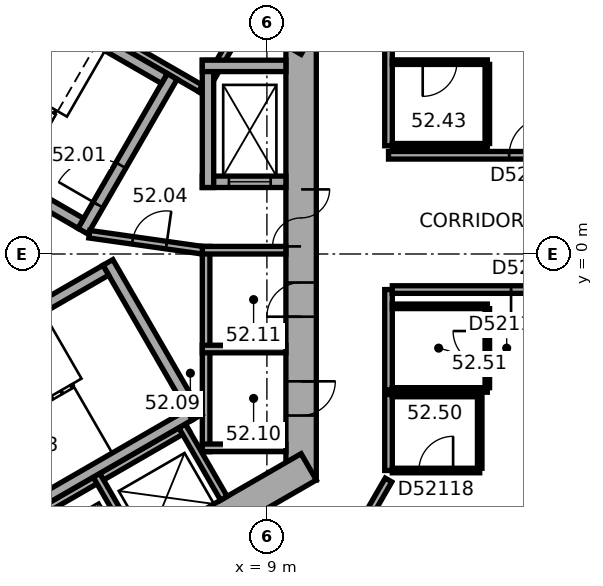
"""IFC4 building model, lengths in metres.
Left out: names, types, materials, properties, quantities, classifications, styles, units other than length and angle.
Written with IfcOpenShell. Run it as: python <this file> out.ifc"""

import sys

from ifc_helpers import new_model, si_unit, direction, frame, frame_2d, origin, place, context, subcontext, project, spatial, rectangle, extrude, element, fill, save


model = new_model("IFC4")
c1 = context("Model", 3, precision=1e-05, world=origin(), true_north=direction((0.0, 1.0)))
c2 = subcontext(c1, "Body", "Model", "MODEL_VIEW")
j1 = project(units=[si_unit("LENGTHUNIT", "METRE"), si_unit("PLANEANGLEUNIT", "RADIAN")], contexts=[c1])
p1 = place(None, origin())
s1 = spatial("IfcSite", under=j1, at=p1, CompositionType="ELEMENT")
p2 = place(p1, origin())
s2 = spatial("IfcBuilding", under=s1, at=p2, CompositionType="ELEMENT")
p3 = place(p2, frame((0.0, 0.0, 210.6)))
s3 = spatial("IfcBuildingStorey", under=s2, at=p3, CompositionType="ELEMENT", Elevation=210.6)
p4 = place(p3, frame((9.9, -5.947, 0.0), z_axis=(0.0, 0.0, 1.0), x_axis=(0.0, 1.0, 0.0)))
e1 = element("IfcWall", 1, at=p4, inside=s3, PredefinedType="SHEAR", context=c2, shape_type="SweptSolid", body=[
    extrude(rectangle(XDim=11.894, YDim=0.8, at=frame_2d((5.947, 0.0))), origin(), (0.0, 0.0, 1.0), 3.7),
])
p5 = place(p4, frame((6.147, 0.0, 0.0)))
e2 = element("IfcOpeningElement", 2, at=p5, cuts=e1, PredefinedType="OPENING", context=c2, shape_type="SweptSolid", body=[
    extrude(rectangle(XDim=1.5, YDim=2.1, at=frame_2d((0.75, 1.05))), frame((0.0, 0.41, 0.0), z_axis=(0.0, -1.0, 0.0), x_axis=(1.0, 0.0, 0.0)), (0.0, 0.0, 1.0), 0.82),
])
p6 = place(p4, frame((1.697, 0.0, 0.0)))
e3 = element("IfcOpeningElement", 3, at=p6, cuts=e1, PredefinedType="OPENING", context=c2, shape_type="SweptSolid", body=[
    extrude(rectangle(XDim=0.9, YDim=2.1, at=frame_2d((0.45, 1.05))), frame((0.0, 0.41, 0.0), z_axis=(0.0, -1.0, 0.0), x_axis=(1.0, 0.0, 0.0)), (0.0, 0.0, 1.0), 0.82),
])
p7 = place(p4, frame((4.297, 0.0, 0.0)))
e4 = element("IfcOpeningElement", 4, at=p7, cuts=e1, PredefinedType="OPENING", context=c2, shape_type="SweptSolid", body=[
    extrude(rectangle(XDim=0.9, YDim=2.1, at=frame_2d((0.45, 1.05))), frame((0.0, 0.41, 0.0), z_axis=(0.0, -1.0, 0.0), x_axis=(1.0, 0.0, 0.0)), (0.0, 0.0, 1.0), 0.82),
])
p8 = place(p3, frame((10.1, 5.6, 0.0), z_axis=(0.0, 0.0, 1.0), x_axis=(-0.866023897231, 0.500002609418, 0.0)))
e5 = element("IfcWall", 5, at=p8, inside=s3, PredefinedType="SHEAR", context=c2, shape_type="SweptSolid", body=[
    extrude(rectangle(XDim=11.894, YDim=0.8, at=frame_2d((5.947, 0.0))), origin(), (0.0, 0.0, 1.0), 3.7),
])
p9 = place(p8, frame((5.197, 0.0, 0.0)))
e6 = element("IfcOpeningElement", 6, at=p9, cuts=e5, PredefinedType="OPENING", context=c2, shape_type="SweptSolid", body=[
    extrude(rectangle(XDim=0.9, YDim=2.1, at=frame_2d((0.45, 1.05))), frame((0.0, 0.41, 0.0), z_axis=(0.0, -1.0, 0.0), x_axis=(1.0, 0.0, 0.0)), (0.0, 0.0, 1.0), 0.82),
])
p10 = place(p3, frame((-0.2, -11.547, 0.0), z_axis=(0.0, 0.0, 1.0), x_axis=(0.866023897231, 0.500002609418, 0.0)))
e7 = element("IfcWall", 7, at=p10, inside=s3, PredefinedType="SHEAR", context=c2, shape_type="SweptSolid", body=[
    extrude(rectangle(XDim=11.894, YDim=0.8, at=frame_2d((5.947, 0.0))), origin(), (0.0, 0.0, 1.0), 3.7),
])
p11 = place(p10, frame((2.497, 0.0, 0.0)))
e8 = element("IfcOpeningElement", 8, at=p11, cuts=e7, PredefinedType="OPENING", context=c2, shape_type="SweptSolid", body=[
    extrude(rectangle(XDim=1.1, YDim=2.1, at=frame_2d((0.55, 1.05))), frame((0.0, 0.41, 0.0), z_axis=(0.0, -1.0, 0.0), x_axis=(1.0, 0.0, 0.0)), (0.0, 0.0, 1.0), 0.82),
])
p12 = place(p10, frame((5.097, 0.0, 0.0)))
e9 = element("IfcOpeningElement", 9, at=p12, cuts=e7, PredefinedType="OPENING", context=c2, shape_type="SweptSolid", body=[
    extrude(rectangle(XDim=1.1, YDim=2.1, at=frame_2d((0.55, 1.05))), frame((0.0, 0.41, 0.0), z_axis=(0.0, -1.0, 0.0), x_axis=(1.0, 0.0, 0.0)), (0.0, 0.0, 1.0), 0.82),
])
p13 = place(p10, frame((7.697, 0.0, 0.0)))
e10 = element("IfcOpeningElement", 10, at=p13, cuts=e7, PredefinedType="OPENING", context=c2, shape_type="SweptSolid", body=[
    extrude(rectangle(XDim=1.1, YDim=2.1, at=frame_2d((0.55, 1.05))), frame((0.0, 0.41, 0.0), z_axis=(0.0, -1.0, 0.0), x_axis=(1.0, 0.0, 0.0)), (0.0, 0.0, 1.0), 0.82),
])
p14 = place(p3, frame((7.4, -5.2, 0.0), z_axis=(0.0, 0.0, 1.0), x_axis=(0.0, 1.0, 0.0)))
e11 = element("IfcWall", 11, at=p14, inside=s3, PredefinedType="PARTITIONING", context=c2, shape_type="SweptSolid", body=[
    extrude(rectangle(XDim=5.4, YDim=0.2, at=frame_2d((2.7, 0.0))), origin(), (0.0, 0.0, 1.0), 3.35),
])
for number, where, z_axis, x_axis in (
    (12, (7.3, -5.1, 0.0), (0.0, 0.0, 1.0), (1.0, 0.0, 0.0)),
    (13, (7.3, -2.5, 0.0), (0.0, 0.0, 1.0), (1.0, 0.0, 0.0)),
    (14, (7.3, 0.1, 0.0), (0.0, 0.0, 1.0), (1.0, 0.0, 0.0)),
):
    element("IfcWall", number, at=place(p3, frame(where, z_axis=z_axis, x_axis=x_axis)), inside=s3, PredefinedType="PARTITIONING", context=c2, shape_type="SweptSolid", body=[
        extrude(rectangle(XDim=2.2, YDim=0.2, at=frame_2d((1.1, 0.0))), origin(), (0.0, 0.0, 1.0), 3.35),
    ])
p15 = place(p3, frame((7.424, 4.259, 0.0), z_axis=(0.0, 0.0, 1.0), x_axis=(-0.866026010844, 0.49999894854, 0.0)))
e15 = element("IfcWall", 15, at=p15, inside=s3, PredefinedType="PARTITIONING", context=c2, shape_type="SweptSolid", body=[
    extrude(rectangle(XDim=8.0, YDim=0.2, at=frame_2d((4.0, 0.0))), origin(), (0.0, 0.0, 1.0), 3.35),
])
p16 = place(p3, frame((7.287, 4.222, 0.0), z_axis=(0.0, 0.0, 1.0), x_axis=(0.499946605688, 0.86605622881, 0.0)))
e16 = element("IfcWall", 16, at=p16, inside=s3, PredefinedType="PARTITIONING", context=c2, shape_type="SweptSolid", body=[
    extrude(rectangle(XDim=2.2, YDim=0.2, at=frame_2d((1.1, 0.0))), origin(), (0.0, 0.0, 1.0), 3.35),
])
p17 = place(p3, frame((-0.024, -8.559, 0.0), z_axis=(0.0, 0.0, 1.0), x_axis=(0.866026010844, 0.49999894854, 0.0)))
e17 = element("IfcWall", 17, at=p17, inside=s3, PredefinedType="PARTITIONING", context=c2, shape_type="SweptSolid", body=[
    extrude(rectangle(XDim=8.0, YDim=0.2, at=frame_2d((4.0, 0.0))), origin(), (0.0, 0.0, 1.0), 3.35),
])
for number, where, z_axis, x_axis in (
    (18, (4.516, -5.822, 0.0), (0.0, 0.0, 1.0), (0.5, -0.866, 0.0)),
    (19, (6.768, -4.522, 0.0), (0.0, 0.0, 1.0), (0.5, -0.866, 0.0)),
):
    element("IfcWall", number, at=place(p3, frame(where, z_axis=z_axis, x_axis=x_axis)), inside=s3, PredefinedType="PARTITIONING", context=c2, shape_type="SweptSolid", body=[
        extrude(rectangle(XDim=2.2, YDim=0.2, at=frame_2d((1.1, 0.0))), origin(), (0.0, 0.0, 1.0), 3.35),
    ])
p18 = place(p3, frame((4.158, 0.602, 0.0), z_axis=(0.0, 0.0, 1.0), x_axis=(0.499977259774, 0.866038532462, 0.0)))
e20 = element("IfcWall", 20, at=p18, inside=s3, PredefinedType="SHEAR", context=c2, shape_type="SweptSolid", body=[
    extrude(rectangle(XDim=4.7, YDim=0.3, at=frame_2d((2.35, 0.0))), origin(), (0.0, 0.0, 1.0), 3.35),
])
p19 = place(p18, frame((0.8, 0.0, 0.0)))
e21 = element("IfcOpeningElement", 21, at=p19, cuts=e20, PredefinedType="OPENING", context=c2, shape_type="SweptSolid", body=[
    extrude(rectangle(XDim=1.2, YDim=2.1, at=frame_2d((0.6, 1.05))), frame((0.0, 0.16, 0.0), z_axis=(0.0, -1.0, 0.0), x_axis=(1.0, 0.0, 0.0)), (0.0, 0.0, 1.0), 0.32),
])
for number, where, z_axis, x_axis in (
    (22, (4.103, 0.807, 0.0), (0.0, 0.0, 1.0), (-0.866, 0.5, 0.0)),
    (23, (6.303, 4.617, 0.0), (0.0, 0.0, 1.0), (-0.866, 0.5, 0.0)),
):
    element("IfcWall", number, at=place(p3, frame(where, z_axis=z_axis, x_axis=x_axis)), inside=s3, PredefinedType="SHEAR", context=c2, shape_type="SweptSolid", body=[
        extrude(rectangle(XDim=7.06, YDim=0.3, at=frame_2d((3.53, 0.0))), origin(), (0.0, 0.0, 1.0), 3.35),
    ])
p20 = place(p3, frame((4.816, -0.222, 0.0), z_axis=(0.0, 0.0, 1.0), x_axis=(0.499977259774, -0.866038532462, 0.0)))
e24 = element("IfcWall", 24, at=p20, inside=s3, PredefinedType="SHEAR", context=c2, shape_type="SweptSolid", body=[
    extrude(rectangle(XDim=4.7, YDim=0.3, at=frame_2d((2.35, 0.0))), origin(), (0.0, 0.0, 1.0), 3.35),
])
for number, where, z_axis, x_axis in (
    (25, (-1.353, -3.957, 0.0), (0.0, 0.0, 1.0), (0.866, 0.5, 0.0)),
    (26, (0.847, -7.767, 0.0), (0.0, 0.0, 1.0), (0.866, 0.5, 0.0)),
):
    element("IfcWall", number, at=place(p3, frame(where, z_axis=z_axis, x_axis=x_axis)), inside=s3, PredefinedType="SHEAR", context=c2, shape_type="SweptSolid", body=[
        extrude(rectangle(XDim=7.06, YDim=0.3, at=frame_2d((3.53, 0.0))), origin(), (0.0, 0.0, 1.0), 3.35),
    ])
p21 = place(p3, frame((7.3, 1.9, 0.0), z_axis=(0.0, 0.0, 1.0), x_axis=(1.0, 0.0, 0.0)))
e27 = element("IfcWall", 27, at=p21, inside=s3, PredefinedType="SHEAR", context=c2, shape_type="SweptSolid", body=[
    extrude(rectangle(XDim=2.2, YDim=0.3, at=frame_2d((1.1, 0.0))), origin(), (0.0, 0.0, 1.0), 3.35),
])
p22 = place(p21, frame((0.7, 0.0, 0.0)))
e28 = element("IfcOpeningElement", 28, at=p22, cuts=e27, PredefinedType="OPENING", context=c2, shape_type="SweptSolid", body=[
    extrude(rectangle(XDim=1.1, YDim=2.1, at=frame_2d((0.55, 1.05))), frame((0.0, 0.16, 0.0), z_axis=(0.0, -1.0, 0.0), x_axis=(1.0, 0.0, 0.0)), (0.0, 0.0, 1.0), 0.32),
])
p23 = place(p3, frame((7.45, 1.75, 0.0), z_axis=(0.0, 0.0, 1.0), x_axis=(0.0, 1.0, 0.0)))
e29 = element("IfcWall", 29, at=p23, inside=s3, PredefinedType="SHEAR", context=c2, shape_type="SweptSolid", body=[
    extrude(rectangle(XDim=3.35, YDim=0.3, at=frame_2d((1.675, 0.0))), origin(), (0.0, 0.0, 1.0), 3.35),
])
p24 = place(p3, frame((7.3, 4.95, 0.0), z_axis=(0.0, 0.0, 1.0), x_axis=(1.0, 0.0, 0.0)))
e30 = element("IfcWall", 30, at=p24, inside=s3, PredefinedType="SHEAR", context=c2, shape_type="SweptSolid", body=[
    extrude(rectangle(XDim=2.2, YDim=0.3, at=frame_2d((1.1, 0.0))), origin(), (0.0, 0.0, 1.0), 3.35),
])
p25 = place(p3, frame((4.327, 0.521, 0.0), z_axis=(0.0, 0.0, 1.0), x_axis=(0.990124376366, -0.14019172346, 0.0)))
e31 = element("IfcWall", 31, at=p25, inside=s3, PredefinedType="PARTITIONING", context=c2, shape_type="SweptSolid", body=[
    extrude(rectangle(XDim=3.002, YDim=0.2, at=frame_2d((1.501, 0.0))), origin(), (0.0, 0.0, 1.0), 3.35),
])
p26 = place(p25, frame((1.15, 0.0, 0.0)))
e32 = element("IfcOpeningElement", 32, at=p26, cuts=e31, PredefinedType="OPENING", context=c2, shape_type="SweptSolid", body=[
    extrude(rectangle(XDim=0.9, YDim=2.1, at=frame_2d((0.45, 1.05))), frame((0.0, 0.11, 0.0), z_axis=(0.0, -1.0, 0.0), x_axis=(1.0, 0.0, 0.0)), (0.0, 0.0, 1.0), 0.22),
])
p27 = place(p3, frame((11.27, -7.558, 0.0), z_axis=(0.0, 0.0, 1.0), x_axis=(0.499964847546, 0.866045698112, 0.0)))
e33 = element("IfcWall", 33, at=p27, inside=s3, PredefinedType="PARTITIONING", context=c2, shape_type="SweptSolid", body=[
    extrude(rectangle(XDim=1.86, YDim=0.2, at=frame_2d((0.93, 0.0))), origin(), (0.0, 0.0, 1.0), 3.35),
])
p28 = place(p3, frame((12.2, -5.697, 0.0), z_axis=(0.0, 0.0, 1.0), x_axis=(0.0, 1.0, 0.0)))
e34 = element("IfcWall", 34, at=p28, inside=s3, PredefinedType="PARTITIONING", context=c2, shape_type="SweptSolid", body=[
    extrude(rectangle(XDim=2.0, YDim=0.2, at=frame_2d((1.0, 0.0))), origin(), (0.0, 0.0, 1.0), 3.35),
])
p29 = place(p3, frame((12.2, -3.577, 0.0), z_axis=(0.0, 0.0, 1.0), x_axis=(0.0, 1.0, 0.0)))
e35 = element("IfcWall", 35, at=p29, inside=s3, PredefinedType="PARTITIONING", context=c2, shape_type="SweptSolid", body=[
    extrude(rectangle(XDim=2.641, YDim=0.2, at=frame_2d((1.321, 0.0))), origin(), (0.0, 0.0, 1.0), 3.35),
])
p30 = place(p3, frame((12.2, 2.848, 0.0), z_axis=(0.0, 0.0, 1.0), x_axis=(0.0, 1.0, 0.0)))
e36 = element("IfcWall", 36, at=p30, inside=s3, PredefinedType="PARTITIONING", context=c2, shape_type="SweptSolid", body=[
    extrude(rectangle(XDim=3.099, YDim=0.2, at=frame_2d((1.549, 0.0))), origin(), (0.0, 0.0, 1.0), 3.35),
])
p31 = place(p3, frame((12.3, -3.697, 0.0), z_axis=(0.0, 0.0, 1.0), x_axis=(1.0, 0.0, 0.0)))
e37 = element("IfcWall", 37, at=p31, inside=s3, PredefinedType="PARTITIONING", context=c2, shape_type="SweptSolid", body=[
    extrude(rectangle(XDim=2.3, YDim=0.12, at=frame_2d((1.15, 0.0))), origin(), (0.0, 0.0, 1.0), 3.35),
])
p32 = place(p3, frame((12.3, -1.377, 0.0), z_axis=(0.0, 0.0, 1.0), x_axis=(1.0, 0.0, 0.0)))
e38 = element("IfcWall", 38, at=p32, inside=s3, PredefinedType="PARTITIONING", context=c2, shape_type="SweptSolid", body=[
    extrude(rectangle(XDim=2.5, YDim=0.12, at=frame_2d((1.25, 0.0))), origin(), (0.0, 0.0, 1.0), 3.35),
])
p33 = place(p3, frame((12.3, -0.936, 0.0), z_axis=(0.0, 0.0, 1.0), x_axis=(1.0, 0.0, 0.0)))
e39 = element("IfcWall", 39, at=p33, inside=s3, PredefinedType="PARTITIONING", context=c2, shape_type="SweptSolid", body=[
    extrude(rectangle(XDim=7.25, YDim=0.2, at=frame_2d((3.625, 0.0))), origin(), (0.0, 0.0, 1.0), 2.65),
])
p34 = place(p33, frame((3.125, 0.0, 0.0)))
e40 = element("IfcOpeningElement", 40, at=p34, cuts=e39, PredefinedType="OPENING", context=c2, shape_type="SweptSolid", body=[
    extrude(rectangle(XDim=1.0, YDim=2.1, at=frame_2d((0.5, 1.05))), frame((0.0, 0.11, 0.0), z_axis=(0.0, -1.0, 0.0), x_axis=(1.0, 0.0, 0.0)), (0.0, 0.0, 1.0), 0.22),
])
p35 = place(p3, frame((12.3, 5.048, 0.0), z_axis=(0.0, 0.0, 1.0), x_axis=(1.0, 0.0, 0.0)))
e41 = element("IfcWall", 41, at=p35, inside=s3, PredefinedType="PARTITIONING", context=c2, shape_type="SweptSolid", body=[
    extrude(rectangle(XDim=2.5, YDim=0.12, at=frame_2d((1.25, 0.0))), origin(), (0.0, 0.0, 1.0), 3.35),
])
p36 = place(p35, frame((0.8, 0.0, 0.0)))
e42 = element("IfcOpeningElement", 42, at=p36, cuts=e41, PredefinedType="OPENING", context=c2, shape_type="SweptSolid", body=[
    extrude(rectangle(XDim=0.9, YDim=2.1, at=frame_2d((0.45, 1.05))), frame((0.0, 0.07, 0.0), z_axis=(0.0, -1.0, 0.0), x_axis=(1.0, 0.0, 0.0)), (0.0, 0.0, 1.0), 0.14),
])
p37 = place(p3, frame((14.6, -5.697, 0.0), z_axis=(0.0, 0.0, 1.0), x_axis=(-1.0, 0.0, 0.0)))
e43 = element("IfcWall", 43, at=p37, inside=s3, PredefinedType="PARTITIONING", context=c2, shape_type="SweptSolid", body=[
    extrude(rectangle(XDim=2.3, YDim=0.12, at=frame_2d((1.15, 0.0))), origin(), (0.0, 0.0, 1.0), 3.35),
])
p38 = place(p37, frame((0.7, 0.0, 0.0)))
e44 = element("IfcOpeningElement", 44, at=p38, cuts=e43, PredefinedType="OPENING", context=c2, shape_type="SweptSolid", body=[
    extrude(rectangle(XDim=0.9, YDim=2.1, at=frame_2d((0.45, 1.05))), frame((0.0, 0.07, 0.0), z_axis=(0.0, -1.0, 0.0), x_axis=(1.0, 0.0, 0.0)), (0.0, 0.0, 1.0), 0.14),
])
p39 = place(p3, frame((14.6, -3.757, 0.0), z_axis=(0.0, 0.0, 1.0), x_axis=(0.0, -1.0, 0.0)))
e45 = element("IfcWall", 45, at=p39, inside=s3, PredefinedType="PARTITIONING", context=c2, shape_type="SweptSolid", body=[
    extrude(rectangle(XDim=1.88, YDim=0.12, at=frame_2d((0.94, 0.0))), origin(), (0.0, 0.0, 1.0), 3.35),
])
p40 = place(p3, frame((14.8, -3.577, 0.0), z_axis=(0.0, 0.0, 1.0), x_axis=(-1.0, 0.0, 0.0)))
e46 = element("IfcWall", 46, at=p40, inside=s3, PredefinedType="PARTITIONING", context=c2, shape_type="SweptSolid", body=[
    extrude(rectangle(XDim=2.5, YDim=0.12, at=frame_2d((1.25, 0.0))), origin(), (0.0, 0.0, 1.0), 3.35),
])
p41 = place(p3, frame((14.8, -1.437, 0.0), z_axis=(0.0, 0.0, 1.0), x_axis=(0.0, -1.0, 0.0)))
e47 = element("IfcWall", 47, at=p41, inside=s3, PredefinedType="PARTITIONING", context=c2, shape_type="SweptSolid", body=[
    extrude(rectangle(XDim=2.08, YDim=0.12, at=frame_2d((1.04, 0.0))), origin(), (0.0, 0.0, 1.0), 3.35),
])
p42 = place(p41, frame((0.59, 0.0, 0.0)))
e48 = element("IfcOpeningElement", 48, at=p42, cuts=e47, PredefinedType="OPENING", context=c2, shape_type="SweptSolid", body=[
    extrude(rectangle(XDim=0.9, YDim=2.1, at=frame_2d((0.45, 1.05))), frame((0.0, 0.07, 0.0), z_axis=(0.0, -1.0, 0.0), x_axis=(1.0, 0.0, 0.0)), (0.0, 0.0, 1.0), 0.14),
])
p43 = place(p3, frame((14.8, 2.848, 0.0), z_axis=(0.0, 0.0, 1.0), x_axis=(-1.0, 0.0, 0.0)))
e49 = element("IfcWall", 49, at=p43, inside=s3, PredefinedType="PARTITIONING", context=c2, shape_type="SweptSolid", body=[
    extrude(rectangle(XDim=2.5, YDim=0.12, at=frame_2d((1.25, 0.0))), origin(), (0.0, 0.0, 1.0), 3.35),
])
p44 = place(p3, frame((14.8, 4.988, 0.0), z_axis=(0.0, 0.0, 1.0), x_axis=(0.0, -1.0, 0.0)))
e50 = element("IfcWall", 50, at=p44, inside=s3, PredefinedType="PARTITIONING", context=c2, shape_type="SweptSolid", body=[
    extrude(rectangle(XDim=2.08, YDim=0.12, at=frame_2d((1.04, 0.0))), origin(), (0.0, 0.0, 1.0), 3.35),
])
p45 = place(p3, frame((19.55, 2.598, 0.0), z_axis=(0.0, 0.0, 1.0), x_axis=(-1.0, 0.0, 0.0)))
e51 = element("IfcWall", 51, at=p45, inside=s3, PredefinedType="PARTITIONING", context=c2, shape_type="SweptSolid", body=[
    extrude(rectangle(XDim=7.35, YDim=0.2, at=frame_2d((3.675, 0.0))), origin(), (0.0, 0.0, 1.0), 3.35),
])
p46 = place(p45, frame((3.175, 0.0, 0.0)))
e52 = element("IfcOpeningElement", 52, at=p46, cuts=e51, PredefinedType="OPENING", context=c2, shape_type="SweptSolid", body=[
    extrude(rectangle(XDim=1.0, YDim=2.1, at=frame_2d((0.5, 1.05))), frame((0.0, 0.11, 0.0), z_axis=(0.0, -1.0, 0.0), x_axis=(1.0, 0.0, 0.0)), (0.0, 0.0, 1.0), 0.22),
])
p47 = place(p5, origin())
e53 = element("IfcDoor", 53, at=p47, inside=s3, OperationType="DOUBLE_DOOR_SINGLE_SWING", PredefinedType="DOOR", context=c2, shape_type="SweptSolid", body=[
    extrude(rectangle(XDim=1.5, YDim=2.1, at=frame_2d((0.75, 1.05))), frame((0.0, 0.025, 0.0), z_axis=(0.0, -1.0, 0.0), x_axis=(1.0, 0.0, 0.0)), (0.0, 0.0, 1.0), 0.05),
])
fill(e2, e53)
p48 = place(p19, origin())
e54 = element("IfcDoor", 54, at=p48, inside=s3, OperationType="SINGLE_SWING_RIGHT", PredefinedType="DOOR", context=c2, shape_type="SweptSolid", body=[
    extrude(rectangle(XDim=1.2, YDim=2.1, at=frame_2d((0.6, 1.05))), frame((0.0, 0.025, 0.0), z_axis=(0.0, -1.0, 0.0), x_axis=(1.0, 0.0, 0.0)), (0.0, 0.0, 1.0), 0.05),
])
fill(e21, e54)
p49 = place(p26, origin())
e55 = element("IfcDoor", 55, at=p49, inside=s3, OperationType="SINGLE_SWING_LEFT", PredefinedType="DOOR", context=c2, shape_type="SweptSolid", body=[
    extrude(rectangle(XDim=0.9, YDim=2.1, at=frame_2d((0.45, 1.05))), frame((0.0, 0.025, 0.0), z_axis=(0.0, -1.0, 0.0), x_axis=(1.0, 0.0, 0.0)), (0.0, 0.0, 1.0), 0.05),
])
fill(e32, e55)
p50 = place(p6, origin())
e56 = element("IfcDoor", 56, at=p50, inside=s3, OperationType="SINGLE_SWING_LEFT", PredefinedType="DOOR", context=c2, shape_type="SweptSolid", body=[
    extrude(rectangle(XDim=0.9, YDim=2.1, at=frame_2d((0.45, 1.05))), frame((0.0, 0.025, 0.0), z_axis=(0.0, -1.0, 0.0), x_axis=(1.0, 0.0, 0.0)), (0.0, 0.0, 1.0), 0.05),
])
fill(e3, e56)
p51 = place(p7, origin())
e57 = element("IfcDoor", 57, at=p51, inside=s3, OperationType="SINGLE_SWING_LEFT", PredefinedType="DOOR", context=c2, shape_type="SweptSolid", body=[
    extrude(rectangle(XDim=0.9, YDim=2.1, at=frame_2d((0.45, 1.05))), frame((0.0, 0.025, 0.0), z_axis=(0.0, -1.0, 0.0), x_axis=(1.0, 0.0, 0.0)), (0.0, 0.0, 1.0), 0.05),
])
fill(e4, e57)
p52 = place(p22, origin())
e58 = element("IfcDoor", 58, at=p52, inside=s3, OperationType="DOUBLE_DOOR_SLIDING", PredefinedType="DOOR", context=c2, shape_type="SweptSolid", body=[
    extrude(rectangle(XDim=1.1, YDim=2.1, at=frame_2d((0.55, 1.05))), frame((0.0, 0.025, 0.0), z_axis=(0.0, -1.0, 0.0), x_axis=(1.0, 0.0, 0.0)), (0.0, 0.0, 1.0), 0.05),
])
fill(e28, e58)
p53 = place(p46, origin())
e59 = element("IfcDoor", 59, at=p53, inside=s3, OperationType="SINGLE_SWING_LEFT", PredefinedType="DOOR", context=c2, shape_type="SweptSolid", body=[
    extrude(rectangle(XDim=1.0, YDim=2.1, at=frame_2d((0.5, 1.05))), frame((0.0, 0.025, 0.0), z_axis=(0.0, -1.0, 0.0), x_axis=(1.0, 0.0, 0.0)), (0.0, 0.0, 1.0), 0.05),
])
fill(e52, e59)
p54 = place(p36, origin())
e60 = element("IfcDoor", 60, at=p54, inside=s3, OperationType="SINGLE_SWING_LEFT", PredefinedType="DOOR", context=c2, shape_type="SweptSolid", body=[
    extrude(rectangle(XDim=0.9, YDim=2.1, at=frame_2d((0.45, 1.05))), frame((0.0, 0.025, 0.0), z_axis=(0.0, -1.0, 0.0), x_axis=(1.0, 0.0, 0.0)), (0.0, 0.0, 1.0), 0.05),
])
fill(e42, e60)
p55 = place(p34, origin())
e61 = element("IfcDoor", 61, at=p55, inside=s3, OperationType="SINGLE_SWING_LEFT", PredefinedType="DOOR", context=c2, shape_type="SweptSolid", body=[
    extrude(rectangle(XDim=1.0, YDim=2.1, at=frame_2d((0.5, 1.05))), frame((0.0, 0.025, 0.0), z_axis=(0.0, -1.0, 0.0), x_axis=(1.0, 0.0, 0.0)), (0.0, 0.0, 1.0), 0.05),
])
fill(e40, e61)
p56 = place(p38, origin())
e62 = element("IfcDoor", 62, at=p56, inside=s3, OperationType="SINGLE_SWING_LEFT", PredefinedType="DOOR", context=c2, shape_type="SweptSolid", body=[
    extrude(rectangle(XDim=0.9, YDim=2.1, at=frame_2d((0.45, 1.05))), frame((0.0, 0.025, 0.0), z_axis=(0.0, -1.0, 0.0), x_axis=(1.0, 0.0, 0.0)), (0.0, 0.0, 1.0), 0.05),
])
fill(e44, e62)
p57 = place(p42, origin())
e63 = element("IfcDoor", 63, at=p57, inside=s3, OperationType="SINGLE_SWING_LEFT", PredefinedType="DOOR", context=c2, shape_type="SweptSolid", body=[
    extrude(rectangle(XDim=0.9, YDim=2.1, at=frame_2d((0.45, 1.05))), frame((0.0, 0.025, 0.0), z_axis=(0.0, -1.0, 0.0), x_axis=(1.0, 0.0, 0.0)), (0.0, 0.0, 1.0), 0.05),
])
fill(e48, e63)
save(model, sys.argv[1])
